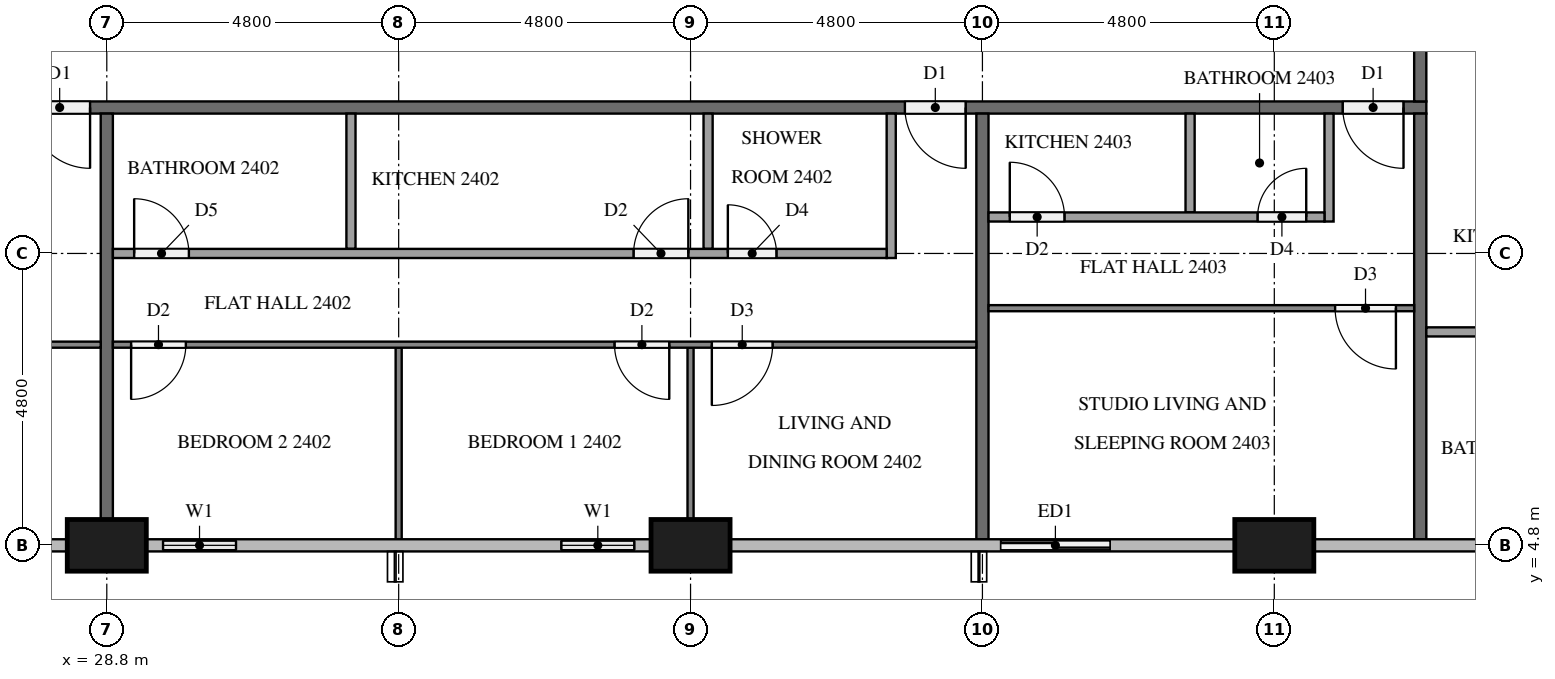
"""IFC4 building model, lengths in metres.
Left out: names, types, materials, properties, quantities, classifications, styles, units other than length and angle.
Written with IfcOpenShell. Run it as: python <this file> out.ifc"""

import sys

from ifc_helpers import new_model, si_unit, direction, frame, frame_2d, origin, origin_2d, place, context, subcontext, project, spatial, rectangle, extrude, element, fill, save


model = new_model("IFC4")
c1 = context("Model", 3, precision=1e-05, world=origin(), true_north=direction((0.0, 1.0)))
c2 = subcontext(c1, "Body", "Model", "MODEL_VIEW")
j1 = project(units=[si_unit("LENGTHUNIT", "METRE"), si_unit("PLANEANGLEUNIT", "RADIAN")], contexts=[c1])
p1 = place(None, origin())
s1 = spatial("IfcSite", under=j1, at=p1, CompositionType="ELEMENT")
p2 = place(p1, origin())
s2 = spatial("IfcBuilding", under=s1, at=p2, CompositionType="ELEMENT")
p3 = place(p2, frame((0.0, 0.0, 96.2)))
s3 = spatial("IfcBuildingStorey", under=s2, at=p3, CompositionType="ELEMENT", Elevation=96.2)
for number, where, z_axis, x_axis in (
    (1, (28.8, 4.8, 0.0), (0.0, 0.0, 1.0), (1.0, 0.0, 0.0)),
    (2, (38.4, 4.8, 0.0), (0.0, 0.0, 1.0), (1.0, 0.0, 0.0)),
    (3, (48.0, 4.8, 0.0), (0.0, 0.0, 1.0), (1.0, 0.0, 0.0)),
):
    element("IfcColumn", number, at=place(p3, frame(where, z_axis=z_axis, x_axis=x_axis)), inside=s3, PredefinedType="COLUMN", context=c2, shape_type="SweptSolid", body=[
        extrude(rectangle(XDim=1.3, YDim=0.85, at=origin_2d()), origin(), (0.0, 0.0, 1.0), 3.2),
    ])
p4 = place(p3, frame((26.4, 4.8, 0.0), z_axis=(0.0, 0.0, 1.0), x_axis=(1.0, 0.0, 0.0)))
e4 = element("IfcWall", 4, at=p4, inside=s3, PredefinedType="SOLIDWALL", context=c2, shape_type="SweptSolid", body=[
    extrude(rectangle(XDim=1.75, YDim=0.15, at=frame_2d((0.875, 0.0))), origin(), (0.0, 0.0, 1.0), 3.2),
])
p5 = place(p4, frame((0.275, 0.0, 0.9)))
e5 = element("IfcOpeningElement", 5, at=p5, cuts=e4, PredefinedType="OPENING", context=c2, shape_type="SweptSolid", body=[
    extrude(rectangle(XDim=1.2, YDim=1.4, at=frame_2d((0.6, 0.7))), frame((0.0, 0.085, 0.0), z_axis=(0.0, -1.0, 0.0), x_axis=(1.0, 0.0, 0.0)), (0.0, 0.0, 1.0), 0.17),
])
p6 = place(p3, frame((29.45, 4.8, 0.0), z_axis=(0.0, 0.0, 1.0), x_axis=(1.0, 0.0, 0.0)))
e6 = element("IfcWall", 6, at=p6, inside=s3, PredefinedType="SOLIDWALL", context=c2, shape_type="SweptSolid", body=[
    extrude(rectangle(XDim=1.75, YDim=0.15, at=frame_2d((0.875, 0.0))), origin(), (0.0, 0.0, 1.0), 3.2),
])
p7 = place(p6, frame((0.275, 0.0, 0.9)))
e7 = element("IfcOpeningElement", 7, at=p7, cuts=e6, PredefinedType="OPENING", context=c2, shape_type="SweptSolid", body=[
    extrude(rectangle(XDim=1.2, YDim=1.4, at=frame_2d((0.6, 0.7))), frame((0.0, 0.085, 0.0), z_axis=(0.0, -1.0, 0.0), x_axis=(1.0, 0.0, 0.0)), (0.0, 0.0, 1.0), 0.17),
])
p8 = place(p3, frame((36.0, 4.8, 0.0), z_axis=(0.0, 0.0, 1.0), x_axis=(1.0, 0.0, 0.0)))
e8 = element("IfcWall", 8, at=p8, inside=s3, PredefinedType="SOLIDWALL", context=c2, shape_type="SweptSolid", body=[
    extrude(rectangle(XDim=1.75, YDim=0.15, at=frame_2d((0.875, 0.0))), origin(), (0.0, 0.0, 1.0), 3.2),
])
p9 = place(p8, frame((0.275, 0.0, 0.9)))
e9 = element("IfcOpeningElement", 9, at=p9, cuts=e8, PredefinedType="OPENING", context=c2, shape_type="SweptSolid", body=[
    extrude(rectangle(XDim=1.2, YDim=1.4, at=frame_2d((0.6, 0.7))), frame((0.0, 0.085, 0.0), z_axis=(0.0, -1.0, 0.0), x_axis=(1.0, 0.0, 0.0)), (0.0, 0.0, 1.0), 0.17),
])
p10 = place(p3, frame((43.2, 4.8, 0.0), z_axis=(0.0, 0.0, 1.0), x_axis=(1.0, 0.0, 0.0)))
e10 = element("IfcWall", 10, at=p10, inside=s3, PredefinedType="SOLIDWALL", context=c2, shape_type="SweptSolid", body=[
    extrude(rectangle(XDim=2.4, YDim=0.15, at=frame_2d((1.2, 0.0))), origin(), (0.0, 0.0, 1.0), 3.2),
])
p11 = place(p10, frame((0.3, 0.0, 0.0)))
e11 = element("IfcOpeningElement", 11, at=p11, cuts=e10, PredefinedType="OPENING", context=c2, shape_type="SweptSolid", body=[
    extrude(rectangle(XDim=1.8, YDim=2.4, at=frame_2d((0.9, 1.2))), frame((0.0, 0.085, 0.0), z_axis=(0.0, -1.0, 0.0), x_axis=(1.0, 0.0, 0.0)), (0.0, 0.0, 1.0), 0.17),
])
p12 = place(p3, frame((50.5, 12.0, 0.0), z_axis=(0.0, 0.0, 1.0), x_axis=(-1.0, 0.0, 0.0)))
e12 = element("IfcWall", 12, at=p12, inside=s3, PredefinedType="PARTITIONING", context=c2, shape_type="SweptSolid", body=[
    extrude(rectangle(XDim=38.6, YDim=0.2, at=frame_2d((19.3, 0.0))), origin(), (0.0, 0.0, 1.0), 3.2),
])
p13 = place(p12, frame((21.975, 0.0, 0.0)))
e13 = element("IfcOpeningElement", 13, at=p13, cuts=e12, PredefinedType="OPENING", context=c2, shape_type="SweptSolid", body=[
    extrude(rectangle(XDim=1.0, YDim=2.1, at=frame_2d((0.5, 1.05))), frame((0.0, 0.11, 0.0), z_axis=(0.0, -1.0, 0.0), x_axis=(1.0, 0.0, 0.0)), (0.0, 0.0, 1.0), 0.22),
])
p14 = place(p12, frame((7.575, 0.0, 0.0)))
e14 = element("IfcOpeningElement", 14, at=p14, cuts=e12, PredefinedType="OPENING", context=c2, shape_type="SweptSolid", body=[
    extrude(rectangle(XDim=1.0, YDim=2.1, at=frame_2d((0.5, 1.05))), frame((0.0, 0.11, 0.0), z_axis=(0.0, -1.0, 0.0), x_axis=(1.0, 0.0, 0.0)), (0.0, 0.0, 1.0), 0.22),
])
p15 = place(p12, frame((0.375, 0.0, 0.0)))
e15 = element("IfcOpeningElement", 15, at=p15, cuts=e12, PredefinedType="OPENING", context=c2, shape_type="SweptSolid", body=[
    extrude(rectangle(XDim=1.0, YDim=2.1, at=frame_2d((0.5, 1.05))), frame((0.0, 0.11, 0.0), z_axis=(0.0, -1.0, 0.0), x_axis=(1.0, 0.0, 0.0)), (0.0, 0.0, 1.0), 0.22),
])
p16 = place(p3, frame((50.4, 14.9, 0.0), z_axis=(0.0, 0.0, 1.0), x_axis=(0.0, -1.0, 0.0)))
e16 = element("IfcWall", 16, at=p16, inside=s3, PredefinedType="PARTITIONING", context=c2, shape_type="SweptSolid", body=[
    extrude(rectangle(XDim=2.8, YDim=0.2, at=frame_2d((1.4, 0.0))), origin(), (0.0, 0.0, 1.0), 3.2),
])
p17 = place(p16, frame((0.175, 0.0, 0.0)))
e17 = element("IfcOpeningElement", 17, at=p17, cuts=e16, PredefinedType="OPENING", context=c2, shape_type="SweptSolid", body=[
    extrude(rectangle(XDim=1.0, YDim=2.1, at=frame_2d((0.5, 1.05))), frame((0.0, 0.11, 0.0), z_axis=(0.0, -1.0, 0.0), x_axis=(1.0, 0.0, 0.0)), (0.0, 0.0, 1.0), 0.22),
])
p18 = place(p3, frame((28.8, 11.9, 0.0), z_axis=(0.0, 0.0, 1.0), x_axis=(0.0, -1.0, 0.0)))
e18 = element("IfcWall", 18, at=p18, inside=s3, PredefinedType="PARTITIONING", context=c2, shape_type="SweptSolid", body=[
    extrude(rectangle(XDim=6.675, YDim=0.2, at=frame_2d((3.337, 0.0))), origin(), (0.0, 0.0, 1.0), 3.2),
])
for number, where, z_axis, x_axis in (
    (19, (43.2, 11.9, 0.0), (0.0, 0.0, 1.0), (0.0, -1.0, 0.0)),
    (20, (50.4, 11.9, 0.0), (0.0, 0.0, 1.0), (0.0, -1.0, 0.0)),
):
    element("IfcWall", number, at=place(p3, frame(where, z_axis=z_axis, x_axis=x_axis)), inside=s3, PredefinedType="PARTITIONING", context=c2, shape_type="SweptSolid", body=[
        extrude(rectangle(XDim=7.0, YDim=0.2, at=frame_2d((3.5, 0.0))), origin(), (0.0, 0.0, 1.0), 3.2),
    ])
p19 = place(p3, frame((28.7, 8.1, 0.0), z_axis=(0.0, 0.0, 1.0), x_axis=(-1.0, 0.0, 0.0)))
e21 = element("IfcWall", 21, at=p19, inside=s3, PredefinedType="PARTITIONING", context=c2, shape_type="SweptSolid", body=[
    extrude(rectangle(XDim=16.6, YDim=0.1, at=frame_2d((8.3, 0.0))), origin(), (0.0, 0.0, 1.0), 3.2),
])
p20 = place(p19, frame((3.45, 0.0, 0.0)))
e22 = element("IfcOpeningElement", 22, at=p20, cuts=e21, PredefinedType="OPENING", context=c2, shape_type="SweptSolid", body=[
    extrude(rectangle(XDim=0.9, YDim=2.1, at=frame_2d((0.45, 1.05))), frame((0.0, 0.06, 0.0), z_axis=(0.0, -1.0, 0.0), x_axis=(1.0, 0.0, 0.0)), (0.0, 0.0, 1.0), 0.12),
])
p21 = place(p19, frame((5.05, 0.0, 0.0)))
e23 = element("IfcOpeningElement", 23, at=p21, cuts=e21, PredefinedType="OPENING", context=c2, shape_type="SweptSolid", body=[
    extrude(rectangle(XDim=1.0, YDim=2.1, at=frame_2d((0.5, 1.05))), frame((0.0, 0.06, 0.0), z_axis=(0.0, -1.0, 0.0), x_axis=(1.0, 0.0, 0.0)), (0.0, 0.0, 1.0), 0.12),
])
p22 = place(p19, frame((15.4, 0.0, 0.0)))
e24 = element("IfcOpeningElement", 24, at=p22, cuts=e21, PredefinedType="OPENING", context=c2, shape_type="SweptSolid", body=[
    extrude(rectangle(XDim=0.9, YDim=2.1, at=frame_2d((0.45, 1.05))), frame((0.0, 0.06, 0.0), z_axis=(0.0, -1.0, 0.0), x_axis=(1.0, 0.0, 0.0)), (0.0, 0.0, 1.0), 0.12),
])
p23 = place(p3, frame((38.4, 8.05, 0.0), z_axis=(0.0, 0.0, 1.0), x_axis=(0.0, -1.0, 0.0)))
e25 = element("IfcWall", 25, at=p23, inside=s3, PredefinedType="PARTITIONING", context=c2, shape_type="SweptSolid", body=[
    extrude(rectangle(XDim=2.825, YDim=0.1, at=frame_2d((1.413, 0.0))), origin(), (0.0, 0.0, 1.0), 3.2),
])
p24 = place(p3, frame((33.6, 8.05, 0.0), z_axis=(0.0, 0.0, 1.0), x_axis=(0.0, -1.0, 0.0)))
e26 = element("IfcWall", 26, at=p24, inside=s3, PredefinedType="PARTITIONING", context=c2, shape_type="SweptSolid", body=[
    extrude(rectangle(XDim=3.15, YDim=0.1, at=frame_2d((1.575, 0.0))), origin(), (0.0, 0.0, 1.0), 3.2),
])
p25 = place(p3, frame((43.1, 8.1, 0.0), z_axis=(0.0, 0.0, 1.0), x_axis=(-1.0, 0.0, 0.0)))
e27 = element("IfcWall", 27, at=p25, inside=s3, PredefinedType="PARTITIONING", context=c2, shape_type="SweptSolid", body=[
    extrude(rectangle(XDim=14.2, YDim=0.1, at=frame_2d((7.1, 0.0))), origin(), (0.0, 0.0, 1.0), 3.2),
])
p26 = place(p25, frame((3.35, 0.0, 0.0)))
e28 = element("IfcOpeningElement", 28, at=p26, cuts=e27, PredefinedType="OPENING", context=c2, shape_type="SweptSolid", body=[
    extrude(rectangle(XDim=1.0, YDim=2.1, at=frame_2d((0.5, 1.05))), frame((0.0, 0.06, 0.0), z_axis=(0.0, -1.0, 0.0), x_axis=(1.0, 0.0, 0.0)), (0.0, 0.0, 1.0), 0.12),
])
p27 = place(p25, frame((5.05, 0.0, 0.0)))
e29 = element("IfcOpeningElement", 29, at=p27, cuts=e27, PredefinedType="OPENING", context=c2, shape_type="SweptSolid", body=[
    extrude(rectangle(XDim=0.9, YDim=2.1, at=frame_2d((0.45, 1.05))), frame((0.0, 0.06, 0.0), z_axis=(0.0, -1.0, 0.0), x_axis=(1.0, 0.0, 0.0)), (0.0, 0.0, 1.0), 0.12),
])
p28 = place(p25, frame((13.0, 0.0, 0.0)))
e30 = element("IfcOpeningElement", 30, at=p28, cuts=e27, PredefinedType="OPENING", context=c2, shape_type="SweptSolid", body=[
    extrude(rectangle(XDim=0.9, YDim=2.1, at=frame_2d((0.45, 1.05))), frame((0.0, 0.06, 0.0), z_axis=(0.0, -1.0, 0.0), x_axis=(1.0, 0.0, 0.0)), (0.0, 0.0, 1.0), 0.12),
])
for number, where, z_axis, x_axis in (
    (31, (38.688, 11.9, 0.0), (0.0, 0.0, 1.0), (0.0, -1.0, 0.0)),
    (32, (32.815, 11.9, 0.0), (0.0, 0.0, 1.0), (0.0, -1.0, 0.0)),
):
    element("IfcWall", number, at=place(p3, frame(where, z_axis=z_axis, x_axis=x_axis)), inside=s3, PredefinedType="PARTITIONING", context=c2, shape_type="SweptSolid", body=[
        extrude(rectangle(XDim=2.225, YDim=0.15, at=frame_2d((1.112, 0.0))), origin(), (0.0, 0.0, 1.0), 3.2),
    ])
p29 = place(p3, frame((41.7, 11.9, 0.0), z_axis=(0.0, 0.0, 1.0), x_axis=(0.0, -1.0, 0.0)))
e33 = element("IfcWall", 33, at=p29, inside=s3, PredefinedType="PARTITIONING", context=c2, shape_type="SweptSolid", body=[
    extrude(rectangle(XDim=2.375, YDim=0.15, at=frame_2d((1.188, 0.0))), origin(), (0.0, 0.0, 1.0), 3.2),
])
p30 = place(p3, frame((28.9, 9.6, 0.0), z_axis=(0.0, 0.0, 1.0), x_axis=(1.0, 0.0, 0.0)))
e34 = element("IfcWall", 34, at=p30, inside=s3, PredefinedType="PARTITIONING", context=c2, shape_type="SweptSolid", body=[
    extrude(rectangle(XDim=12.725, YDim=0.15, at=frame_2d((6.363, 0.0))), origin(), (0.0, 0.0, 1.0), 3.2),
])
p31 = place(p30, frame((10.114, 0.0, 0.0)))
e35 = element("IfcOpeningElement", 35, at=p31, cuts=e34, PredefinedType="OPENING", context=c2, shape_type="SweptSolid", body=[
    extrude(rectangle(XDim=0.8, YDim=2.1, at=frame_2d((0.4, 1.05))), frame((0.0, 0.085, 0.0), z_axis=(0.0, -1.0, 0.0), x_axis=(1.0, 0.0, 0.0)), (0.0, 0.0, 1.0), 0.17),
])
p32 = place(p30, frame((8.563, 0.0, 0.0)))
e36 = element("IfcOpeningElement", 36, at=p32, cuts=e34, PredefinedType="OPENING", context=c2, shape_type="SweptSolid", body=[
    extrude(rectangle(XDim=0.9, YDim=2.1, at=frame_2d((0.45, 1.05))), frame((0.0, 0.085, 0.0), z_axis=(0.0, -1.0, 0.0), x_axis=(1.0, 0.0, 0.0)), (0.0, 0.0, 1.0), 0.17),
])
p33 = place(p30, frame((0.35, 0.0, 0.0)))
e37 = element("IfcOpeningElement", 37, at=p33, cuts=e34, PredefinedType="OPENING", context=c2, shape_type="SweptSolid", body=[
    extrude(rectangle(XDim=0.9, YDim=2.1, at=frame_2d((0.45, 1.05))), frame((0.0, 0.085, 0.0), z_axis=(0.0, -1.0, 0.0), x_axis=(1.0, 0.0, 0.0)), (0.0, 0.0, 1.0), 0.17),
])
p34 = place(p3, frame((50.3, 8.7, 0.0), z_axis=(0.0, 0.0, 1.0), x_axis=(-1.0, 0.0, 0.0)))
e38 = element("IfcWall", 38, at=p34, inside=s3, PredefinedType="PARTITIONING", context=c2, shape_type="SweptSolid", body=[
    extrude(rectangle(XDim=7.0, YDim=0.1, at=frame_2d((3.5, 0.0))), origin(), (0.0, 0.0, 1.0), 3.2),
])
p35 = place(p34, frame((0.3, 0.0, 0.0)))
e39 = element("IfcOpeningElement", 39, at=p35, cuts=e38, PredefinedType="OPENING", context=c2, shape_type="SweptSolid", body=[
    extrude(rectangle(XDim=1.0, YDim=2.1, at=frame_2d((0.5, 1.05))), frame((0.0, 0.06, 0.0), z_axis=(0.0, -1.0, 0.0), x_axis=(1.0, 0.0, 0.0)), (0.0, 0.0, 1.0), 0.12),
])
p36 = place(p3, frame((46.615, 11.9, 0.0), z_axis=(0.0, 0.0, 1.0), x_axis=(0.0, -1.0, 0.0)))
e40 = element("IfcWall", 40, at=p36, inside=s3, PredefinedType="PARTITIONING", context=c2, shape_type="SweptSolid", body=[
    extrude(rectangle(XDim=1.625, YDim=0.15, at=frame_2d((0.812, 0.0))), origin(), (0.0, 0.0, 1.0), 3.2),
])
p37 = place(p3, frame((48.9, 11.9, 0.0), z_axis=(0.0, 0.0, 1.0), x_axis=(0.0, -1.0, 0.0)))
e41 = element("IfcWall", 41, at=p37, inside=s3, PredefinedType="PARTITIONING", context=c2, shape_type="SweptSolid", body=[
    extrude(rectangle(XDim=1.775, YDim=0.15, at=frame_2d((0.887, 0.0))), origin(), (0.0, 0.0, 1.0), 3.2),
])
p38 = place(p3, frame((43.3, 10.2, 0.0), z_axis=(0.0, 0.0, 1.0), x_axis=(1.0, 0.0, 0.0)))
e42 = element("IfcWall", 42, at=p38, inside=s3, PredefinedType="PARTITIONING", context=c2, shape_type="SweptSolid", body=[
    extrude(rectangle(XDim=5.525, YDim=0.15, at=frame_2d((2.762, 0.0))), origin(), (0.0, 0.0, 1.0), 3.2),
])
p39 = place(p38, frame((4.425, 0.0, 0.0)))
e43 = element("IfcOpeningElement", 43, at=p39, cuts=e42, PredefinedType="OPENING", context=c2, shape_type="SweptSolid", body=[
    extrude(rectangle(XDim=0.8, YDim=2.1, at=frame_2d((0.4, 1.05))), frame((0.0, 0.085, 0.0), z_axis=(0.0, -1.0, 0.0), x_axis=(1.0, 0.0, 0.0)), (0.0, 0.0, 1.0), 0.17),
])
p40 = place(p38, frame((0.35, 0.0, 0.0)))
e44 = element("IfcOpeningElement", 44, at=p40, cuts=e42, PredefinedType="OPENING", context=c2, shape_type="SweptSolid", body=[
    extrude(rectangle(XDim=0.9, YDim=2.1, at=frame_2d((0.45, 1.05))), frame((0.0, 0.085, 0.0), z_axis=(0.0, -1.0, 0.0), x_axis=(1.0, 0.0, 0.0)), (0.0, 0.0, 1.0), 0.17),
])
p41 = place(p3, frame((50.5, 8.31, 0.0), z_axis=(0.0, 0.0, 1.0), x_axis=(1.0, 0.0, 0.0)))
e45 = element("IfcWall", 45, at=p41, inside=s3, PredefinedType="PARTITIONING", context=c2, shape_type="SweptSolid", body=[
    extrude(rectangle(XDim=2.975, YDim=0.15, at=frame_2d((1.488, 0.0))), origin(), (0.0, 0.0, 1.0), 3.2),
])
p42 = place(p7, origin())
e46 = element("IfcWindow", 46, at=p42, inside=s3, PartitioningType="SINGLE_PANEL", PredefinedType="WINDOW", context=c2, shape_type="SweptSolid", body=[
    extrude(rectangle(XDim=1.2, YDim=1.4, at=frame_2d((0.6, 0.7))), frame((0.0, 0.03, 0.0), z_axis=(0.0, -1.0, 0.0), x_axis=(1.0, 0.0, 0.0)), (0.0, 0.0, 1.0), 0.06),
])
fill(e7, e46)
p43 = place(p9, origin())
e47 = element("IfcWindow", 47, at=p43, inside=s3, PartitioningType="SINGLE_PANEL", PredefinedType="WINDOW", context=c2, shape_type="SweptSolid", body=[
    extrude(rectangle(XDim=1.2, YDim=1.4, at=frame_2d((0.6, 0.7))), frame((0.0, 0.03, 0.0), z_axis=(0.0, -1.0, 0.0), x_axis=(1.0, 0.0, 0.0)), (0.0, 0.0, 1.0), 0.06),
])
fill(e9, e47)
p44 = place(p11, origin())
e48 = element("IfcDoor", 48, at=p44, inside=s3, OperationType="SLIDING_TO_LEFT", PredefinedType="DOOR", context=c2, shape_type="SweptSolid", body=[
    extrude(rectangle(XDim=1.8, YDim=2.4, at=frame_2d((0.9, 1.2))), frame((0.0, 0.025, 0.0), z_axis=(0.0, -1.0, 0.0), x_axis=(1.0, 0.0, 0.0)), (0.0, 0.0, 1.0), 0.05),
])
fill(e11, e48)
p45 = place(p13, origin())
e49 = element("IfcDoor", 49, at=p45, inside=s3, OperationType="SINGLE_SWING_LEFT", PredefinedType="DOOR", context=c2, shape_type="SweptSolid", body=[
    extrude(rectangle(XDim=1.0, YDim=2.1, at=frame_2d((0.5, 1.05))), frame((0.0, 0.025, 0.0), z_axis=(0.0, -1.0, 0.0), x_axis=(1.0, 0.0, 0.0)), (0.0, 0.0, 1.0), 0.05),
])
fill(e13, e49)
p46 = place(p14, origin())
e50 = element("IfcDoor", 50, at=p46, inside=s3, OperationType="SINGLE_SWING_LEFT", PredefinedType="DOOR", context=c2, shape_type="SweptSolid", body=[
    extrude(rectangle(XDim=1.0, YDim=2.1, at=frame_2d((0.5, 1.05))), frame((0.0, 0.025, 0.0), z_axis=(0.0, -1.0, 0.0), x_axis=(1.0, 0.0, 0.0)), (0.0, 0.0, 1.0), 0.05),
])
fill(e14, e50)
p47 = place(p15, origin())
e51 = element("IfcDoor", 51, at=p47, inside=s3, OperationType="SINGLE_SWING_LEFT", PredefinedType="DOOR", context=c2, shape_type="SweptSolid", body=[
    extrude(rectangle(XDim=1.0, YDim=2.1, at=frame_2d((0.5, 1.05))), frame((0.0, 0.025, 0.0), z_axis=(0.0, -1.0, 0.0), x_axis=(1.0, 0.0, 0.0)), (0.0, 0.0, 1.0), 0.05),
])
fill(e15, e51)
p48 = place(p26, origin())
e52 = element("IfcDoor", 52, at=p48, inside=s3, OperationType="SINGLE_SWING_RIGHT", PredefinedType="DOOR", context=c2, shape_type="SweptSolid", body=[
    extrude(rectangle(XDim=1.0, YDim=2.1, at=frame_2d((0.5, 1.05))), frame((0.0, 0.025, 0.0), z_axis=(0.0, -1.0, 0.0), x_axis=(1.0, 0.0, 0.0)), (0.0, 0.0, 1.0), 0.05),
])
fill(e28, e52)
p49 = place(p27, origin())
e53 = element("IfcDoor", 53, at=p49, inside=s3, OperationType="SINGLE_SWING_LEFT", PredefinedType="DOOR", context=c2, shape_type="SweptSolid", body=[
    extrude(rectangle(XDim=0.9, YDim=2.1, at=frame_2d((0.45, 1.05))), frame((0.0, 0.025, 0.0), z_axis=(0.0, -1.0, 0.0), x_axis=(1.0, 0.0, 0.0)), (0.0, 0.0, 1.0), 0.05),
])
fill(e29, e53)
p50 = place(p28, origin())
e54 = element("IfcDoor", 54, at=p50, inside=s3, OperationType="SINGLE_SWING_RIGHT", PredefinedType="DOOR", context=c2, shape_type="SweptSolid", body=[
    extrude(rectangle(XDim=0.9, YDim=2.1, at=frame_2d((0.45, 1.05))), frame((0.0, 0.025, 0.0), z_axis=(0.0, -1.0, 0.0), x_axis=(1.0, 0.0, 0.0)), (0.0, 0.0, 1.0), 0.05),
])
fill(e30, e54)
p51 = place(p31, origin())
e55 = element("IfcDoor", 55, at=p51, inside=s3, OperationType="SINGLE_SWING_LEFT", PredefinedType="DOOR", context=c2, shape_type="SweptSolid", body=[
    extrude(rectangle(XDim=0.8, YDim=2.1, at=frame_2d((0.4, 1.05))), frame((0.0, 0.025, 0.0), z_axis=(0.0, -1.0, 0.0), x_axis=(1.0, 0.0, 0.0)), (0.0, 0.0, 1.0), 0.05),
])
fill(e35, e55)
p52 = place(p32, origin())
e56 = element("IfcDoor", 56, at=p52, inside=s3, OperationType="SINGLE_SWING_RIGHT", PredefinedType="DOOR", context=c2, shape_type="SweptSolid", body=[
    extrude(rectangle(XDim=0.9, YDim=2.1, at=frame_2d((0.45, 1.05))), frame((0.0, 0.025, 0.0), z_axis=(0.0, -1.0, 0.0), x_axis=(1.0, 0.0, 0.0)), (0.0, 0.0, 1.0), 0.05),
])
fill(e36, e56)
p53 = place(p33, origin())
e57 = element("IfcDoor", 57, at=p53, inside=s3, OperationType="SINGLE_SWING_LEFT", PredefinedType="DOOR", context=c2, shape_type="SweptSolid", body=[
    extrude(rectangle(XDim=0.9, YDim=2.1, at=frame_2d((0.45, 1.05))), frame((0.0, 0.025, 0.0), z_axis=(0.0, -1.0, 0.0), x_axis=(1.0, 0.0, 0.0)), (0.0, 0.0, 1.0), 0.05),
])
fill(e37, e57)
p54 = place(p35, origin())
e58 = element("IfcDoor", 58, at=p54, inside=s3, OperationType="SINGLE_SWING_LEFT", PredefinedType="DOOR", context=c2, shape_type="SweptSolid", body=[
    extrude(rectangle(XDim=1.0, YDim=2.1, at=frame_2d((0.5, 1.05))), frame((0.0, 0.025, 0.0), z_axis=(0.0, -1.0, 0.0), x_axis=(1.0, 0.0, 0.0)), (0.0, 0.0, 1.0), 0.05),
])
fill(e39, e58)
p55 = place(p39, origin())
e59 = element("IfcDoor", 59, at=p55, inside=s3, OperationType="SINGLE_SWING_RIGHT", PredefinedType="DOOR", context=c2, shape_type="SweptSolid", body=[
    extrude(rectangle(XDim=0.8, YDim=2.1, at=frame_2d((0.4, 1.05))), frame((0.0, 0.025, 0.0), z_axis=(0.0, -1.0, 0.0), x_axis=(1.0, 0.0, 0.0)), (0.0, 0.0, 1.0), 0.05),
])
fill(e43, e59)
p56 = place(p40, origin())
e60 = element("IfcDoor", 60, at=p56, inside=s3, OperationType="SINGLE_SWING_LEFT", PredefinedType="DOOR", context=c2, shape_type="SweptSolid", body=[
    extrude(rectangle(XDim=0.9, YDim=2.1, at=frame_2d((0.45, 1.05))), frame((0.0, 0.025, 0.0), z_axis=(0.0, -1.0, 0.0), x_axis=(1.0, 0.0, 0.0)), (0.0, 0.0, 1.0), 0.05),
])
fill(e44, e60)
save(model, sys.argv[1])
